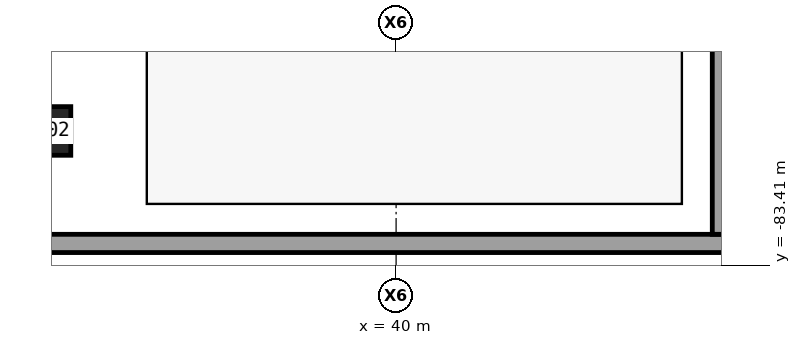
"""IFC4 building model, lengths in metres.
Left out: names, types, materials, properties, quantities, classifications, styles, units other than length and angle.
Written with IfcOpenShell. Run it as: python <this file> out.ifc"""

import sys

from ifc_helpers import new_model, si_unit, direction, frame, origin, origin_2d, place, context, subcontext, project, spatial, polyline, rectangle, outline, extrude, element, save


model = new_model("IFC4")
c1 = context("Model", 3, precision=1e-05, world=origin(), true_north=direction((0.0, 1.0)))
c2 = subcontext(c1, "Body", "Model", "MODEL_VIEW")
j1 = project(units=[si_unit("LENGTHUNIT", "METRE"), si_unit("PLANEANGLEUNIT", "RADIAN")], contexts=[c1])
p1 = place(None, origin())
s1 = spatial("IfcSite", under=j1, at=p1, CompositionType="ELEMENT")
p2 = place(p1, origin())
s2 = spatial("IfcBuilding", under=s1, at=p2, CompositionType="ELEMENT")
p3 = place(p2, frame((0.0, 0.0, -9.0)))
s3 = spatial("IfcBuildingStorey", under=s2, at=p3, CompositionType="ELEMENT", Elevation=-9.0)
p4 = place(p3, frame((-51.0, -82.7, 0.0), z_axis=(0.0, 0.0, 1.0), x_axis=(1.0, 0.0, 0.0)))
e1 = element("IfcWall", 1, at=p4, inside=s3, PredefinedType="SOLIDWALL", context=c2, shape_type="SweptSolid", body=[
    extrude(outline(polyline([(0.0, -0.3), (0.0, 0.3), (0.6, 0.3), (101.4, 0.3), (102.0, 0.3), (102.0, -0.3), (0.0, -0.3)])), origin(), (0.0, 0.0, 1.0), 4.5),
])
p5 = place(p3, frame((50.7, -83.0, 0.0), z_axis=(0.0, 0.0, 1.0), x_axis=(0.0, 1.0, 0.0)))
e2 = element("IfcWall", 2, at=p5, inside=s3, PredefinedType="SOLIDWALL", context=c2, shape_type="SweptSolid", body=[
    extrude(outline(polyline([(0.6, -0.3), (0.6, 0.3), (81.4, 0.3), (82.0, 0.3), (82.0, -0.3), (0.6, -0.3)])), origin(), (0.0, 0.0, 1.0), 4.5),
])
p6 = place(p3, frame((28.5, -79.0, 0.0), z_axis=(0.0, 0.0, 1.0), x_axis=(1.0, 0.0, 0.0)))
e3 = element("IfcColumn", 3, at=p6, inside=s3, PredefinedType="COLUMN", context=c2, shape_type="SweptSolid", body=[
    extrude(rectangle(XDim=1.6, YDim=1.6, at=origin_2d()), origin(), (0.0, 0.0, 1.0), 4.5),
])
save(model, sys.argv[1])
